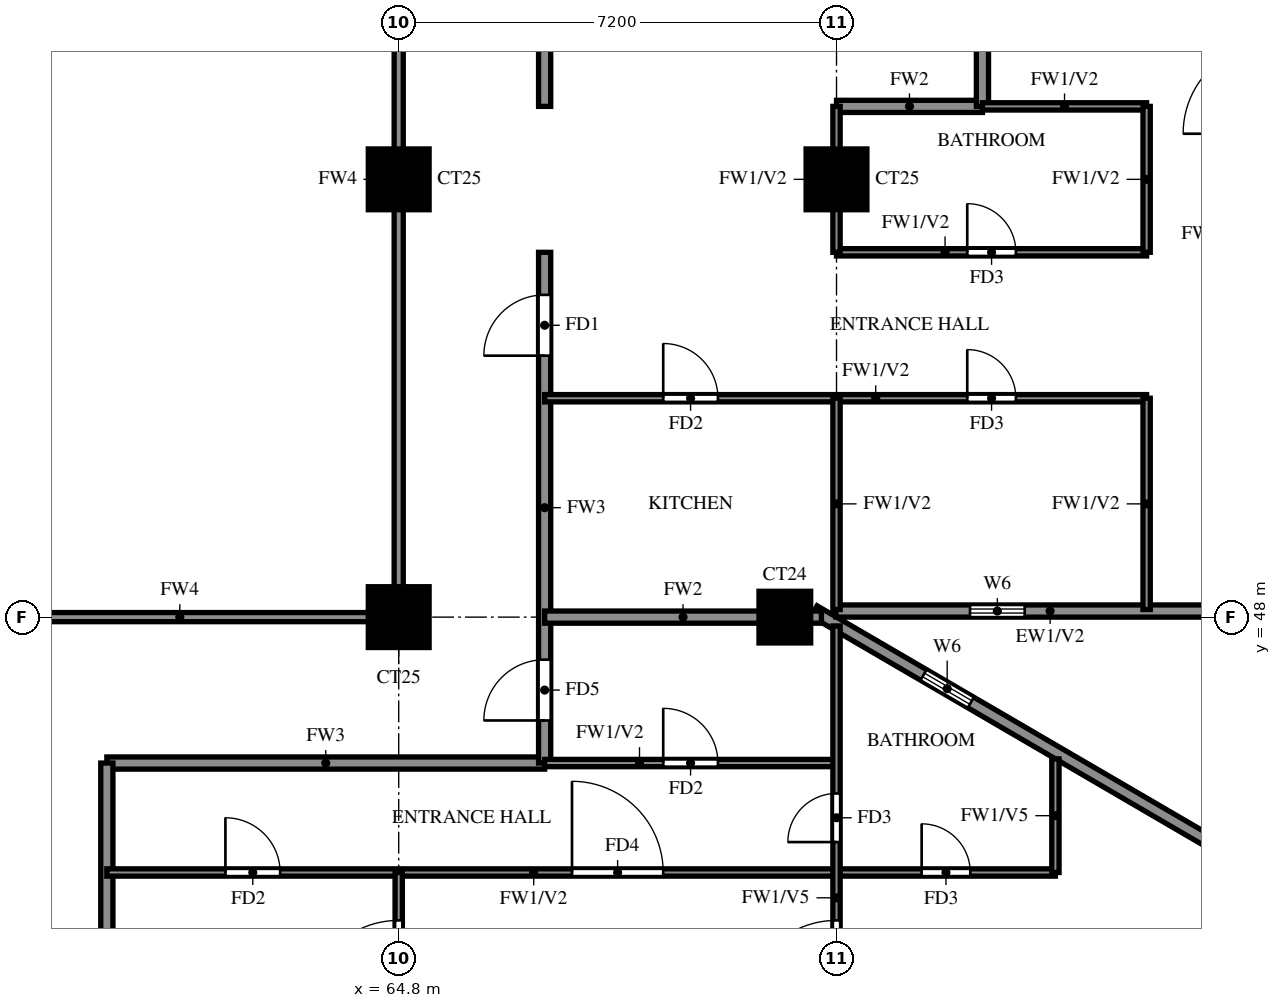
"""IFC4 building model, lengths in metres.
Left out: names, types, materials, properties, quantities, classifications, styles, units other than length and angle.
Written with IfcOpenShell. Run it as: python <this file> out.ifc"""

import sys

from ifc_helpers import new_model, si_unit, direction, frame, frame_2d, origin, origin_2d, place, context, subcontext, project, spatial, rectangle, extrude, source, transform, mapped, element, fill, save


model = new_model("IFC4")
c1 = context("Model", 3, precision=1e-05, world=origin(), true_north=direction((0.0, 1.0)))
c2 = subcontext(c1, "Body", "Model", "MODEL_VIEW")
j1 = project(units=[si_unit("LENGTHUNIT", "METRE"), si_unit("PLANEANGLEUNIT", "RADIAN")], contexts=[c1])
p1 = place(None, origin())
s1 = spatial("IfcSite", under=j1, at=p1, CompositionType="ELEMENT")
p2 = place(p1, origin())
s2 = spatial("IfcBuilding", under=s1, at=p2, CompositionType="ELEMENT")
p3 = place(p2, frame((0.0, 0.0, 143.0)))
s3 = spatial("IfcBuildingStorey", under=s2, at=p3, CompositionType="ELEMENT", Elevation=143.0)
m1 = source(origin(), c2, "Body", "SweptSolid", [
    extrude(rectangle(XDim=1.0, YDim=1.0, at=origin_2d()), origin(), (0.0, 0.0, 1.0), 3.2),
])
p4 = place(p3, frame((64.8, 48.0, 0.0), z_axis=(0.0, 0.0, 1.0), x_axis=(1.0, 0.0, 0.0)))
e1 = element("IfcColumn", 1, at=p4, inside=s3, PredefinedType="COLUMN", context=c2, shape_type="MappedRepresentation", body=[
    mapped(m1, transform((0.0, 0.0, 0.0))),
])
m2 = source(origin(), c2, "Body", "SweptSolid", [
    extrude(rectangle(XDim=0.85, YDim=0.85, at=origin_2d()), origin(), (0.0, 0.0, 1.0), 3.2),
])
p5 = place(p3, frame((71.15, 48.0, 0.0), z_axis=(0.0, 0.0, 1.0), x_axis=(1.0, 0.0, 0.0)))
e2 = element("IfcColumn", 2, at=p5, inside=s3, PredefinedType="COLUMN", context=c2, shape_type="MappedRepresentation", body=[
    mapped(m2, transform((0.0, 0.0, 0.0))),
])
for number, where, z_axis, x_axis in (
    (3, (64.8, 55.2, 0.0), (0.0, 0.0, 1.0), (1.0, 0.0, 0.0)),
    (4, (72.0, 55.2, 0.0), (0.0, 0.0, 1.0), (1.0, 0.0, 0.0)),
):
    element("IfcColumn", number, at=place(p3, frame(where, z_axis=z_axis, x_axis=x_axis)), inside=s3, PredefinedType="COLUMN", context=c2, shape_type="MappedRepresentation", body=[
        mapped(m1, transform((0.0, 0.0, 0.0))),
    ])
p6 = place(p3, frame((85.719, 39.881, 0.0), z_axis=(0.0, 0.0, 1.0), x_axis=(-0.86377618652, 0.503875678716, 0.0)))
e5 = element("IfcWall", 5, at=p6, inside=s3, PredefinedType="SOLIDWALL", context=c2, shape_type="SweptSolid", body=[
    extrude(rectangle(XDim=16.311, YDim=0.2, at=frame_2d((8.156, 0.0))), origin(), (0.0, 0.0, 1.0), 3.2),
])
p7 = place(p6, frame((13.326, 0.0, 1.5)))
e6 = element("IfcOpeningElement", 6, at=p7, cuts=e5, PredefinedType="OPENING", context=c2, shape_type="SweptSolid", body=[
    extrude(rectangle(XDim=0.9, YDim=0.9, at=frame_2d((0.45, 0.45))), frame((0.0, 0.11, 0.0), z_axis=(0.0, -1.0, 0.0), x_axis=(1.0, 0.0, 0.0)), (0.0, 0.0, 1.0), 0.22),
])
p8 = place(p3, frame((71.99, 48.1, 0.0), z_axis=(0.0, 0.0, 1.0), x_axis=(1.0, 0.0, 0.0)))
e7 = element("IfcWall", 7, at=p8, inside=s3, PredefinedType="SOLIDWALL", context=c2, shape_type="SweptSolid", body=[
    extrude(rectangle(XDim=6.71, YDim=0.2, at=frame_2d((3.355, 0.0))), origin(), (0.0, 0.0, 1.0), 3.2),
])
p9 = place(p8, frame((2.205, 0.0, 1.5)))
e8 = element("IfcOpeningElement", 8, at=p9, cuts=e7, PredefinedType="OPENING", context=c2, shape_type="SweptSolid", body=[
    extrude(rectangle(XDim=0.9, YDim=0.9, at=frame_2d((0.45, 0.45))), frame((0.0, 0.11, 0.0), z_axis=(0.0, -1.0, 0.0), x_axis=(1.0, 0.0, 0.0)), (0.0, 0.0, 1.0), 0.22),
])
p10 = place(p3, frame((60.0, 45.6, 0.0), z_axis=(0.0, 0.0, 1.0), x_axis=(1.0, 0.0, 0.0)))
e9 = element("IfcWall", 9, at=p10, inside=s3, PredefinedType="SOLIDWALL", context=c2, shape_type="SweptSolid", body=[
    extrude(rectangle(XDim=7.2, YDim=0.2, at=frame_2d((3.6, 0.0))), origin(), (0.0, 0.0, 1.0), 3.2),
])
p11 = place(p3, frame((60.0, 39.725, 0.0), z_axis=(0.0, 0.0, 1.0), x_axis=(0.0, 1.0, 0.0)))
e10 = element("IfcWall", 10, at=p11, inside=s3, PredefinedType="SOLIDWALL", context=c2, shape_type="SweptSolid", body=[
    extrude(rectangle(XDim=5.875, YDim=0.2, at=frame_2d((2.938, 0.0))), origin(), (0.0, 0.0, 1.0), 3.2),
])
p12 = place(p3, frame((67.2, 45.6, 0.0), z_axis=(0.0, 0.0, 1.0), x_axis=(0.0, 1.0, 0.0)))
e11 = element("IfcWall", 11, at=p12, inside=s3, PredefinedType="SOLIDWALL", context=c2, shape_type="SweptSolid", body=[
    extrude(rectangle(XDim=8.4, YDim=0.2, at=frame_2d((4.2, 0.0))), origin(), (0.0, 0.0, 1.0), 3.2),
])
p13 = place(p12, frame((6.7, 0.0, 0.0)))
e12 = element("IfcOpeningElement", 12, at=p13, cuts=e11, PredefinedType="OPENING", context=c2, shape_type="SweptSolid", body=[
    extrude(rectangle(XDim=1.0, YDim=2.1, at=frame_2d((0.5, 1.05))), frame((0.0, 0.11, 0.0), z_axis=(0.0, -1.0, 0.0), x_axis=(1.0, 0.0, 0.0)), (0.0, 0.0, 1.0), 0.22),
])
p14 = place(p12, frame((0.7, 0.0, 0.0)))
e13 = element("IfcOpeningElement", 13, at=p14, cuts=e11, PredefinedType="OPENING", context=c2, shape_type="SweptSolid", body=[
    extrude(rectangle(XDim=1.0, YDim=2.1, at=frame_2d((0.5, 1.05))), frame((0.0, 0.11, 0.0), z_axis=(0.0, -1.0, 0.0), x_axis=(1.0, 0.0, 0.0)), (0.0, 0.0, 1.0), 0.22),
])
p15 = place(p3, frame((67.2, 56.4, 0.0), z_axis=(0.0, 0.0, 1.0), x_axis=(0.0, 1.0, 0.0)))
e14 = element("IfcWall", 14, at=p15, inside=s3, PredefinedType="SOLIDWALL", context=c2, shape_type="SweptSolid", body=[
    extrude(rectangle(XDim=6.0, YDim=0.2, at=frame_2d((3.0, 0.0))), origin(), (0.0, 0.0, 1.0), 3.2),
])
p16 = place(p15, frame((3.7, 0.0, 0.0)))
e15 = element("IfcOpeningElement", 15, at=p16, cuts=e14, PredefinedType="OPENING", context=c2, shape_type="SweptSolid", body=[
    extrude(rectangle(XDim=1.0, YDim=2.1, at=frame_2d((0.5, 1.05))), frame((0.0, 0.11, 0.0), z_axis=(0.0, -1.0, 0.0), x_axis=(1.0, 0.0, 0.0)), (0.0, 0.0, 1.0), 0.22),
])
p17 = place(p3, frame((67.2, 48.0, 0.0), z_axis=(0.0, 0.0, 1.0), x_axis=(1.0, 0.0, 0.0)))
e16 = element("IfcWall", 16, at=p17, inside=s3, PredefinedType="SOLIDWALL", context=c2, shape_type="SweptSolid", body=[
    extrude(rectangle(XDim=4.552, YDim=0.2, at=frame_2d((2.276, 0.0))), origin(), (0.0, 0.0, 1.0), 3.2),
])
p18 = place(p3, frame((72.0, 56.4, 0.0), z_axis=(0.0, 0.0, 1.0), x_axis=(1.0, 0.0, 0.0)))
e17 = element("IfcWall", 17, at=p18, inside=s3, PredefinedType="SOLIDWALL", context=c2, shape_type="SweptSolid", body=[
    extrude(rectangle(XDim=2.4, YDim=0.2, at=frame_2d((1.2, 0.0))), origin(), (0.0, 0.0, 1.0), 3.2),
])
p19 = place(p3, frame((74.4, 56.4, 0.0), z_axis=(0.0, 0.0, 1.0), x_axis=(0.0, 1.0, 0.0)))
e18 = element("IfcWall", 18, at=p19, inside=s3, PredefinedType="SOLIDWALL", context=c2, shape_type="SweptSolid", body=[
    extrude(rectangle(XDim=2.4, YDim=0.2, at=frame_2d((1.2, 0.0))), origin(), (0.0, 0.0, 1.0), 3.2),
])
p20 = place(p3, frame((60.0, 43.8, 0.0), z_axis=(0.0, 0.0, 1.0), x_axis=(1.0, 0.0, 0.0)))
e19 = element("IfcWall", 19, at=p20, inside=s3, PredefinedType="PARTITIONING", context=c2, shape_type="SweptSolid", body=[
    extrude(rectangle(XDim=15.6, YDim=0.12, at=frame_2d((7.8, 0.0))), origin(), (0.0, 0.0, 1.0), 3.2),
])
p21 = place(p20, frame((7.65, 0.0, 0.0)))
e20 = element("IfcOpeningElement", 20, at=p21, cuts=e19, PredefinedType="OPENING", context=c2, shape_type="SweptSolid", body=[
    extrude(rectangle(XDim=1.5, YDim=2.1, at=frame_2d((0.75, 1.05))), frame((0.0, 0.07, 0.0), z_axis=(0.0, -1.0, 0.0), x_axis=(1.0, 0.0, 0.0)), (0.0, 0.0, 1.0), 0.14),
])
p22 = place(p20, frame((1.95, 0.0, 0.0)))
e21 = element("IfcOpeningElement", 21, at=p22, cuts=e19, PredefinedType="OPENING", context=c2, shape_type="SweptSolid", body=[
    extrude(rectangle(XDim=0.9, YDim=2.1, at=frame_2d((0.45, 1.05))), frame((0.0, 0.07, 0.0), z_axis=(0.0, -1.0, 0.0), x_axis=(1.0, 0.0, 0.0)), (0.0, 0.0, 1.0), 0.14),
])
p23 = place(p20, frame((13.4, 0.0, 0.0)))
e22 = element("IfcOpeningElement", 22, at=p23, cuts=e19, PredefinedType="OPENING", context=c2, shape_type="SweptSolid", body=[
    extrude(rectangle(XDim=0.8, YDim=2.1, at=frame_2d((0.4, 1.05))), frame((0.0, 0.07, 0.0), z_axis=(0.0, -1.0, 0.0), x_axis=(1.0, 0.0, 0.0)), (0.0, 0.0, 1.0), 0.14),
])
p24 = place(p3, frame((67.2, 45.6, 0.0), z_axis=(0.0, 0.0, 1.0), x_axis=(1.0, 0.0, 0.0)))
e23 = element("IfcWall", 23, at=p24, inside=s3, PredefinedType="PARTITIONING", context=c2, shape_type="SweptSolid", body=[
    extrude(rectangle(XDim=4.8, YDim=0.12, at=frame_2d((2.4, 0.0))), origin(), (0.0, 0.0, 1.0), 3.2),
])
p25 = place(p24, frame((1.95, 0.0, 0.0)))
e24 = element("IfcOpeningElement", 24, at=p25, cuts=e23, PredefinedType="OPENING", context=c2, shape_type="SweptSolid", body=[
    extrude(rectangle(XDim=0.9, YDim=2.1, at=frame_2d((0.45, 1.05))), frame((0.0, 0.07, 0.0), z_axis=(0.0, -1.0, 0.0), x_axis=(1.0, 0.0, 0.0)), (0.0, 0.0, 1.0), 0.14),
])
p26 = place(p3, frame((67.2, 51.6, 0.0), z_axis=(0.0, 0.0, 1.0), x_axis=(1.0, 0.0, 0.0)))
e25 = element("IfcWall", 25, at=p26, inside=s3, PredefinedType="PARTITIONING", context=c2, shape_type="SweptSolid", body=[
    extrude(rectangle(XDim=9.9, YDim=0.12, at=frame_2d((4.95, 0.0))), origin(), (0.0, 0.0, 1.0), 3.2),
])
p27 = place(p26, frame((6.95, 0.0, 0.0)))
e26 = element("IfcOpeningElement", 26, at=p27, cuts=e25, PredefinedType="OPENING", context=c2, shape_type="SweptSolid", body=[
    extrude(rectangle(XDim=0.8, YDim=2.1, at=frame_2d((0.4, 1.05))), frame((0.0, 0.07, 0.0), z_axis=(0.0, -1.0, 0.0), x_axis=(1.0, 0.0, 0.0)), (0.0, 0.0, 1.0), 0.14),
])
p28 = place(p26, frame((1.95, 0.0, 0.0)))
e27 = element("IfcOpeningElement", 27, at=p28, cuts=e25, PredefinedType="OPENING", context=c2, shape_type="SweptSolid", body=[
    extrude(rectangle(XDim=0.9, YDim=2.1, at=frame_2d((0.45, 1.05))), frame((0.0, 0.07, 0.0), z_axis=(0.0, -1.0, 0.0), x_axis=(1.0, 0.0, 0.0)), (0.0, 0.0, 1.0), 0.14),
])
p29 = place(p3, frame((72.0, 54.0, 0.0), z_axis=(0.0, 0.0, 1.0), x_axis=(1.0, 0.0, 0.0)))
e28 = element("IfcWall", 28, at=p29, inside=s3, PredefinedType="PARTITIONING", context=c2, shape_type="SweptSolid", body=[
    extrude(rectangle(XDim=5.1, YDim=0.12, at=frame_2d((2.55, 0.0))), origin(), (0.0, 0.0, 1.0), 3.2),
])
p30 = place(p29, frame((2.15, 0.0, 0.0)))
e29 = element("IfcOpeningElement", 29, at=p30, cuts=e28, PredefinedType="OPENING", context=c2, shape_type="SweptSolid", body=[
    extrude(rectangle(XDim=0.8, YDim=2.1, at=frame_2d((0.4, 1.05))), frame((0.0, 0.07, 0.0), z_axis=(0.0, -1.0, 0.0), x_axis=(1.0, 0.0, 0.0)), (0.0, 0.0, 1.0), 0.14),
])
p31 = place(p3, frame((74.4, 56.4, 0.0), z_axis=(0.0, 0.0, 1.0), x_axis=(1.0, 0.0, 0.0)))
e30 = element("IfcWall", 30, at=p31, inside=s3, PredefinedType="PARTITIONING", context=c2, shape_type="SweptSolid", body=[
    extrude(rectangle(XDim=2.7, YDim=0.12, at=frame_2d((1.35, 0.0))), origin(), (0.0, 0.0, 1.0), 3.2),
])
p32 = place(p3, frame((64.8, 39.725, 0.0), z_axis=(0.0, 0.0, 1.0), x_axis=(0.0, 1.0, 0.0)))
e31 = element("IfcWall", 31, at=p32, inside=s3, PredefinedType="PARTITIONING", context=c2, shape_type="SweptSolid", body=[
    extrude(rectangle(XDim=4.075, YDim=0.12, at=frame_2d((2.038, 0.0))), origin(), (0.0, 0.0, 1.0), 3.2),
])
p33 = place(p32, frame((1.788, 0.0, 0.0)))
e32 = element("IfcOpeningElement", 32, at=p33, cuts=e31, PredefinedType="OPENING", context=c2, shape_type="SweptSolid", body=[
    extrude(rectangle(XDim=1.5, YDim=2.1, at=frame_2d((0.75, 1.05))), frame((0.0, 0.07, 0.0), z_axis=(0.0, -1.0, 0.0), x_axis=(1.0, 0.0, 0.0)), (0.0, 0.0, 1.0), 0.14),
])
p34 = place(p3, frame((72.0, 39.725, 0.0), z_axis=(0.0, 0.0, 1.0), x_axis=(0.0, 1.0, 0.0)))
e33 = element("IfcWall", 33, at=p34, inside=s3, PredefinedType="PARTITIONING", context=c2, shape_type="SweptSolid", body=[
    extrude(rectangle(XDim=8.13, YDim=0.12, at=frame_2d((4.065, 0.0))), origin(), (0.0, 0.0, 1.0), 2.3),
])
p35 = place(p34, frame((1.788, 0.0, 0.0)))
e34 = element("IfcOpeningElement", 34, at=p35, cuts=e33, PredefinedType="OPENING", context=c2, shape_type="SweptSolid", body=[
    extrude(rectangle(XDim=1.5, YDim=2.1, at=frame_2d((0.75, 1.05))), frame((0.0, 0.07, 0.0), z_axis=(0.0, -1.0, 0.0), x_axis=(1.0, 0.0, 0.0)), (0.0, 0.0, 1.0), 0.14),
])
p36 = place(p34, frame((4.575, 0.0, 0.0)))
e35 = element("IfcOpeningElement", 35, at=p36, cuts=e33, PredefinedType="OPENING", context=c2, shape_type="SweptSolid", body=[
    extrude(rectangle(XDim=0.8, YDim=2.1, at=frame_2d((0.4, 1.05))), frame((0.0, 0.07, 0.0), z_axis=(0.0, -1.0, 0.0), x_axis=(1.0, 0.0, 0.0)), (0.0, 0.0, 1.0), 0.14),
])
p37 = place(p3, frame((72.0, 48.125, 0.0), z_axis=(0.0, 0.0, 1.0), x_axis=(0.0, 1.0, 0.0)))
e36 = element("IfcWall", 36, at=p37, inside=s3, PredefinedType="PARTITIONING", context=c2, shape_type="SweptSolid", body=[
    extrude(rectangle(XDim=3.475, YDim=0.12, at=frame_2d((1.738, 0.0))), origin(), (0.0, 0.0, 1.0), 3.2),
])
p38 = place(p3, frame((72.0, 54.0, 0.0), z_axis=(0.0, 0.0, 1.0), x_axis=(0.0, 1.0, 0.0)))
e37 = element("IfcWall", 37, at=p38, inside=s3, PredefinedType="PARTITIONING", context=c2, shape_type="SweptSolid", body=[
    extrude(rectangle(XDim=2.4, YDim=0.12, at=frame_2d((1.2, 0.0))), origin(), (0.0, 0.0, 1.0), 3.2),
])
p39 = place(p3, frame((75.6, 43.8, 0.0), z_axis=(0.0, 0.0, 1.0), x_axis=(0.0, 1.0, 0.0)))
e38 = element("IfcWall", 38, at=p39, inside=s3, PredefinedType="PARTITIONING", context=c2, shape_type="SweptSolid", body=[
    extrude(rectangle(XDim=1.868, YDim=0.12, at=frame_2d((0.934, 0.0))), origin(), (0.0, 0.0, 1.0), 2.3),
])
p40 = place(p3, frame((77.1, 48.125, 0.0), z_axis=(0.0, 0.0, 1.0), x_axis=(0.0, 1.0, 0.0)))
e39 = element("IfcWall", 39, at=p40, inside=s3, PredefinedType="PARTITIONING", context=c2, shape_type="SweptSolid", body=[
    extrude(rectangle(XDim=3.475, YDim=0.12, at=frame_2d((1.738, 0.0))), origin(), (0.0, 0.0, 1.0), 3.2),
])
p41 = place(p3, frame((77.1, 54.0, 0.0), z_axis=(0.0, 0.0, 1.0), x_axis=(0.0, 1.0, 0.0)))
e40 = element("IfcWall", 40, at=p41, inside=s3, PredefinedType="PARTITIONING", context=c2, shape_type="SweptSolid", body=[
    extrude(rectangle(XDim=2.4, YDim=0.12, at=frame_2d((1.2, 0.0))), origin(), (0.0, 0.0, 1.0), 3.2),
])
p42 = place(p3, frame((57.6, 48.0, 0.0), z_axis=(0.0, 0.0, 1.0), x_axis=(1.0, 0.0, 0.0)))
e41 = element("IfcWall", 41, at=p42, inside=s3, PredefinedType="SOLIDWALL", context=c2, shape_type="SweptSolid", body=[
    extrude(rectangle(XDim=7.2, YDim=0.15, at=frame_2d((3.6, 0.0))), origin(), (0.0, 0.0, 1.0), 2.3),
])
p43 = place(p3, frame((64.8, 48.0, 0.0), z_axis=(0.0, 0.0, 1.0), x_axis=(0.0, 1.0, 0.0)))
e42 = element("IfcWall", 42, at=p43, inside=s3, PredefinedType="SOLIDWALL", context=c2, shape_type="SweptSolid", body=[
    extrude(rectangle(XDim=14.4, YDim=0.15, at=frame_2d((7.2, 0.0))), origin(), (0.0, 0.0, 1.0), 2.3),
])
p44 = place(p7, origin())
e43 = element("IfcWindow", 43, at=p44, inside=s3, PartitioningType="SINGLE_PANEL", PredefinedType="WINDOW", context=c2, shape_type="SweptSolid", body=[
    extrude(rectangle(XDim=0.9, YDim=0.9, at=frame_2d((0.45, 0.45))), frame((0.0, 0.03, 0.0), z_axis=(0.0, -1.0, 0.0), x_axis=(1.0, 0.0, 0.0)), (0.0, 0.0, 1.0), 0.06),
])
fill(e6, e43)
p45 = place(p9, origin())
e44 = element("IfcWindow", 44, at=p45, inside=s3, PartitioningType="SINGLE_PANEL", PredefinedType="WINDOW", context=c2, shape_type="SweptSolid", body=[
    extrude(rectangle(XDim=0.9, YDim=0.9, at=frame_2d((0.45, 0.45))), frame((0.0, 0.03, 0.0), z_axis=(0.0, -1.0, 0.0), x_axis=(1.0, 0.0, 0.0)), (0.0, 0.0, 1.0), 0.06),
])
fill(e8, e44)
p46 = place(p13, origin())
e45 = element("IfcDoor", 45, at=p46, inside=s3, OperationType="SINGLE_SWING_LEFT", PredefinedType="DOOR", context=c2, shape_type="SweptSolid", body=[
    extrude(rectangle(XDim=1.0, YDim=2.1, at=frame_2d((0.5, 1.05))), frame((0.0, 0.025, 0.0), z_axis=(0.0, -1.0, 0.0), x_axis=(1.0, 0.0, 0.0)), (0.0, 0.0, 1.0), 0.05),
])
fill(e12, e45)
p47 = place(p27, origin())
e46 = element("IfcDoor", 46, at=p47, inside=s3, OperationType="SINGLE_SWING_LEFT", PredefinedType="DOOR", context=c2, shape_type="SweptSolid", body=[
    extrude(rectangle(XDim=0.8, YDim=2.1, at=frame_2d((0.4, 1.05))), frame((0.0, 0.025, 0.0), z_axis=(0.0, -1.0, 0.0), x_axis=(1.0, 0.0, 0.0)), (0.0, 0.0, 1.0), 0.05),
])
fill(e26, e46)
p48 = place(p30, origin())
e47 = element("IfcDoor", 47, at=p48, inside=s3, OperationType="SINGLE_SWING_LEFT", PredefinedType="DOOR", context=c2, shape_type="SweptSolid", body=[
    extrude(rectangle(XDim=0.8, YDim=2.1, at=frame_2d((0.4, 1.05))), frame((0.0, 0.025, 0.0), z_axis=(0.0, -1.0, 0.0), x_axis=(1.0, 0.0, 0.0)), (0.0, 0.0, 1.0), 0.05),
])
fill(e29, e47)
p49 = place(p28, origin())
e48 = element("IfcDoor", 48, at=p49, inside=s3, OperationType="SINGLE_SWING_RIGHT", PredefinedType="DOOR", context=c2, shape_type="SweptSolid", body=[
    extrude(rectangle(XDim=0.9, YDim=2.1, at=frame_2d((0.45, 1.05))), frame((0.0, 0.025, 0.0), z_axis=(0.0, -1.0, 0.0), x_axis=(1.0, 0.0, 0.0)), (0.0, 0.0, 1.0), 0.05),
])
fill(e27, e48)
p50 = place(p33, origin())
e49 = element("IfcDoor", 49, at=p50, inside=s3, OperationType="SINGLE_SWING_RIGHT", PredefinedType="DOOR", context=c2, shape_type="SweptSolid", body=[
    extrude(rectangle(XDim=1.5, YDim=2.1, at=frame_2d((0.75, 1.05))), frame((0.0, 0.025, 0.0), z_axis=(0.0, -1.0, 0.0), x_axis=(1.0, 0.0, 0.0)), (0.0, 0.0, 1.0), 0.05),
])
fill(e32, e49)
p51 = place(p25, origin())
e50 = element("IfcDoor", 50, at=p51, inside=s3, OperationType="SINGLE_SWING_RIGHT", PredefinedType="DOOR", context=c2, shape_type="SweptSolid", body=[
    extrude(rectangle(XDim=0.9, YDim=2.1, at=frame_2d((0.45, 1.05))), frame((0.0, 0.025, 0.0), z_axis=(0.0, -1.0, 0.0), x_axis=(1.0, 0.0, 0.0)), (0.0, 0.0, 1.0), 0.05),
])
fill(e24, e50)
p52 = place(p14, origin())
e51 = element("IfcDoor", 51, at=p52, inside=s3, OperationType="SINGLE_SWING_LEFT", PredefinedType="DOOR", context=c2, shape_type="SweptSolid", body=[
    extrude(rectangle(XDim=1.0, YDim=2.1, at=frame_2d((0.5, 1.05))), frame((0.0, 0.025, 0.0), z_axis=(0.0, -1.0, 0.0), x_axis=(1.0, 0.0, 0.0)), (0.0, 0.0, 1.0), 0.05),
])
fill(e13, e51)
p53 = place(p21, origin())
e52 = element("IfcDoor", 52, at=p53, inside=s3, OperationType="SINGLE_SWING_LEFT", PredefinedType="DOOR", context=c2, shape_type="SweptSolid", body=[
    extrude(rectangle(XDim=1.5, YDim=2.1, at=frame_2d((0.75, 1.05))), frame((0.0, 0.025, 0.0), z_axis=(0.0, -1.0, 0.0), x_axis=(1.0, 0.0, 0.0)), (0.0, 0.0, 1.0), 0.05),
])
fill(e20, e52)
p54 = place(p22, origin())
e53 = element("IfcDoor", 53, at=p54, inside=s3, OperationType="SINGLE_SWING_RIGHT", PredefinedType="DOOR", context=c2, shape_type="SweptSolid", body=[
    extrude(rectangle(XDim=0.9, YDim=2.1, at=frame_2d((0.45, 1.05))), frame((0.0, 0.025, 0.0), z_axis=(0.0, -1.0, 0.0), x_axis=(1.0, 0.0, 0.0)), (0.0, 0.0, 1.0), 0.05),
])
fill(e21, e53)
p55 = place(p35, origin())
e54 = element("IfcDoor", 54, at=p55, inside=s3, OperationType="SINGLE_SWING_RIGHT", PredefinedType="DOOR", context=c2, shape_type="SweptSolid", body=[
    extrude(rectangle(XDim=1.5, YDim=2.1, at=frame_2d((0.75, 1.05))), frame((0.0, 0.025, 0.0), z_axis=(0.0, -1.0, 0.0), x_axis=(1.0, 0.0, 0.0)), (0.0, 0.0, 1.0), 0.05),
])
fill(e34, e54)
p56 = place(p36, origin())
e55 = element("IfcDoor", 55, at=p56, inside=s3, OperationType="SINGLE_SWING_LEFT", PredefinedType="DOOR", context=c2, shape_type="SweptSolid", body=[
    extrude(rectangle(XDim=0.8, YDim=2.1, at=frame_2d((0.4, 1.05))), frame((0.0, 0.025, 0.0), z_axis=(0.0, -1.0, 0.0), x_axis=(1.0, 0.0, 0.0)), (0.0, 0.0, 1.0), 0.05),
])
fill(e35, e55)
p57 = place(p23, origin())
e56 = element("IfcDoor", 56, at=p57, inside=s3, OperationType="SINGLE_SWING_RIGHT", PredefinedType="DOOR", context=c2, shape_type="SweptSolid", body=[
    extrude(rectangle(XDim=0.8, YDim=2.1, at=frame_2d((0.4, 1.05))), frame((0.0, 0.025, 0.0), z_axis=(0.0, -1.0, 0.0), x_axis=(1.0, 0.0, 0.0)), (0.0, 0.0, 1.0), 0.05),
])
fill(e22, e56)
save(model, sys.argv[1])
